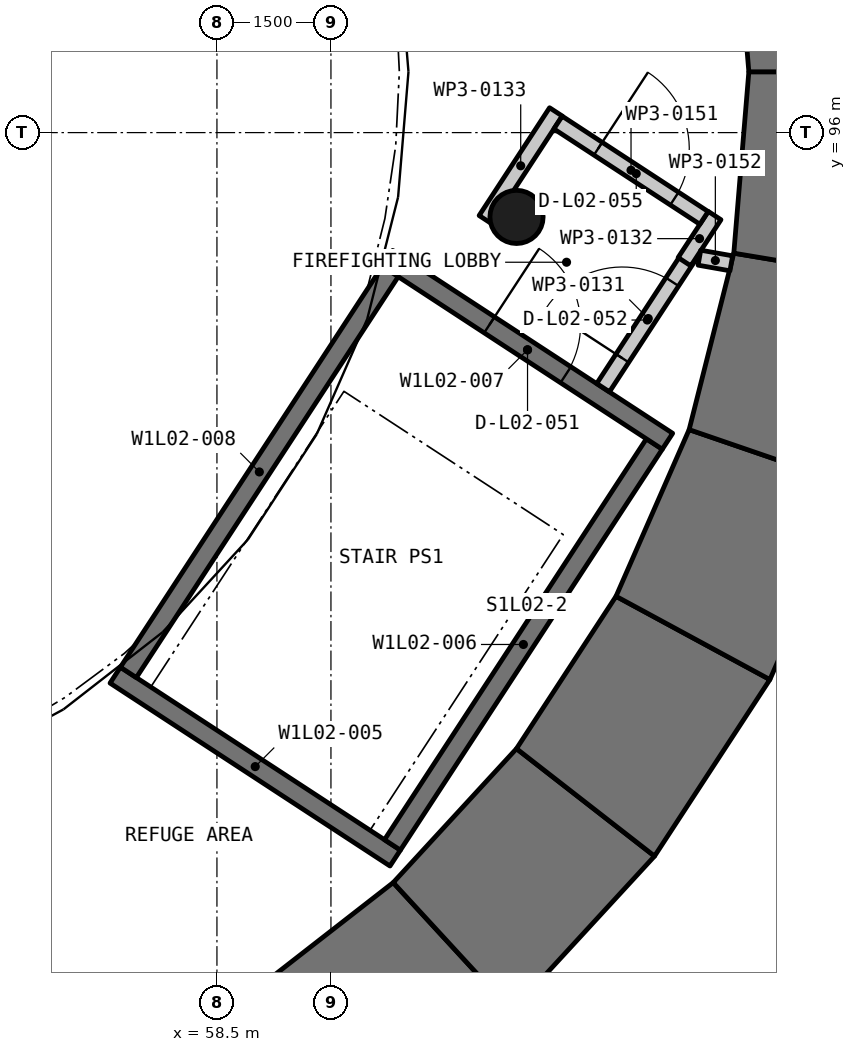
"""IFC4 building model, lengths in metres.
Left out: names, types, materials, properties, quantities, classifications, styles, units other than length and angle.
Written with IfcOpenShell. Run it as: python <this file> out.ifc"""

import sys

from ifc_helpers import new_model, si_unit, direction, frame, frame_2d, origin, origin_2d, place, context, subcontext, project, spatial, polyline, rectangle, circle, outline, extrude, element, fill, save


model = new_model("IFC4")
c1 = context("Model", 3, precision=1e-05, world=origin(), true_north=direction((0.0, 1.0)))
c2 = subcontext(c1, "Body", "Model", "MODEL_VIEW")
j1 = project(units=[si_unit("LENGTHUNIT", "METRE"), si_unit("PLANEANGLEUNIT", "RADIAN")], contexts=[c1])
p1 = place(None, origin())
s1 = spatial("IfcSite", under=j1, at=p1, CompositionType="ELEMENT")
p2 = place(p1, origin())
s2 = spatial("IfcBuilding", under=s1, at=p2, CompositionType="ELEMENT")
p3 = place(p2, frame((0.0, 0.0, 11.25)))
s3 = spatial("IfcBuildingStorey", under=s2, at=p3, CompositionType="ELEMENT", Elevation=11.25)
p4 = place(p3, frame((62.442, 94.891, -0.3), z_axis=(0.0, 0.0, 1.0), x_axis=(1.0, 0.0, 0.0)))
e1 = element("IfcColumn", 1, at=p4, inside=s3, PredefinedType="COLUMN", context=c2, shape_type="SweptSolid", body=[
    extrude(circle(Radius=0.35, at=origin_2d()), origin(), (0.0, 0.0, 1.0), 4.5),
])
p5 = place(p3, frame((59.484, 83.641, -0.3), z_axis=(0.0, 0.0, 1.0), x_axis=(0.789101039288, 0.614263420525, 0.0)))
e2 = element("IfcWall", 2, at=p5, inside=s3, PredefinedType="SHEAR", context=c2, shape_type="SweptSolid", body=[
    extrude(outline(polyline([(-0.0, -1.147), (2.774, -1.147), (2.584, 1.147), (0.19, 1.147), (-0.0, -1.147)])), origin(), (0.0, 0.0, 1.0), 2.25),
])
p6 = place(p3, frame((61.534, 85.217, -0.3), z_axis=(0.0, 0.0, 1.0), x_axis=(0.677292845284, 0.73571353238, 0.0)))
e3 = element("IfcWall", 3, at=p6, inside=s3, PredefinedType="SHEAR", context=c2, shape_type="SweptSolid", body=[
    extrude(outline(polyline([(0.0, -1.147), (2.775, -1.147), (2.585, 1.147), (0.19, 1.147), (0.0, -1.147)])), origin(), (0.0, 0.0, 1.0), 2.25),
])
p7 = place(p3, frame((63.297, 87.109, -0.3), z_axis=(0.0, 0.0, 1.0), x_axis=(0.546960095535, 0.83715867904, 0.0)))
e4 = element("IfcWall", 4, at=p7, inside=s3, PredefinedType="SHEAR", context=c2, shape_type="SweptSolid", body=[
    extrude(outline(polyline([(0.0, -1.147), (2.775, -1.147), (2.585, 1.147), (0.19, 1.147), (0.0, -1.147)])), origin(), (0.0, 0.0, 1.0), 2.25),
])
p8 = place(p3, frame((64.725, 89.265, -0.3), z_axis=(0.0, 0.0, 1.0), x_axis=(0.401700336395, 0.91577117215, 0.0)))
e5 = element("IfcWall", 5, at=p8, inside=s3, PredefinedType="SHEAR", context=c2, shape_type="SweptSolid", body=[
    extrude(outline(polyline([(0.0, -1.147), (2.774, -1.147), (2.584, 1.147), (0.19, 1.147), (0.0, -1.147)])), origin(), (0.0, 0.0, 1.0), 2.25),
])
p9 = place(p3, frame((65.778, 91.627, -0.3), z_axis=(0.0, 0.0, 1.0), x_axis=(0.24549513697, 0.96939782222, 0.0)))
e6 = element("IfcWall", 6, at=p9, inside=s3, PredefinedType="SHEAR", context=c2, shape_type="SweptSolid", body=[
    extrude(outline(polyline([(-0.0, -1.147), (2.775, -1.147), (2.585, 1.147), (0.19, 1.147), (-0.0, -1.147)])), origin(), (0.0, 0.0, 1.0), 2.25),
])
p10 = place(p3, frame((66.428, 94.13, -0.3), z_axis=(0.0, 0.0, 1.0), x_axis=(0.082535726981, 0.996588106377, 0.0)))
e7 = element("IfcWall", 7, at=p10, inside=s3, PredefinedType="SHEAR", context=c2, shape_type="SweptSolid", body=[
    extrude(outline(polyline([(0.0, -1.147), (2.775, -1.147), (2.584, 1.147), (0.19, 1.147), (0.0, -1.147)])), origin(), (0.0, 0.0, 1.0), 2.25),
])
p11 = place(p3, frame((66.657, 96.705, -0.3), z_axis=(0.0, 0.0, 1.0), x_axis=(-0.082535726981, 0.996588106377, 0.0)))
e8 = element("IfcWall", 8, at=p11, inside=s3, PredefinedType="SHEAR", context=c2, shape_type="SweptSolid", body=[
    extrude(outline(polyline([(0.0, -1.147), (2.775, -1.147), (2.584, 1.147), (0.19, 1.147), (0.0, -1.147)])), origin(), (0.0, 0.0, 1.0), 2.25),
])
p12 = place(p3, frame((59.34, 83.907, 1.95), z_axis=(0.0, 0.0, 1.0), x_axis=(0.789096659822, 0.614269046476, 0.0)))
e9 = element("IfcWall", 9, at=p12, inside=s3, PredefinedType="SHEAR", context=c2, shape_type="SweptSolid", body=[
    extrude(outline(polyline([(-0.0, -0.848), (2.676, -0.848), (2.535, 0.848), (0.14, 0.848), (-0.0, -0.848)])), origin(), (0.0, 0.0, 1.0), 2.25),
])
p13 = place(p3, frame((61.348, 85.456, 1.95), z_axis=(0.0, 0.0, 1.0), x_axis=(0.677256164306, 0.735747298949, 0.0)))
e10 = element("IfcWall", 10, at=p13, inside=s3, PredefinedType="SHEAR", context=c2, shape_type="SweptSolid", body=[
    extrude(outline(polyline([(0.0, -0.848), (2.676, -0.848), (2.535, 0.848), (0.14, 0.848), (0.0, -0.848)])), origin(), (0.0, 0.0, 1.0), 2.25),
])
p14 = place(p3, frame((63.074, 87.313, 1.95), z_axis=(0.0, 0.0, 1.0), x_axis=(0.546927267379, 0.837180126494, 0.0)))
e11 = element("IfcWall", 11, at=p14, inside=s3, PredefinedType="SHEAR", context=c2, shape_type="SweptSolid", body=[
    extrude(outline(polyline([(0.0, -0.848), (2.676, -0.848), (2.535, 0.848), (0.141, 0.848), (0.0, -0.848)])), origin(), (0.0, 0.0, 1.0), 2.25),
])
p15 = place(p3, frame((64.471, 89.43, 1.95), z_axis=(0.0, 0.0, 1.0), x_axis=(0.401680291361, 0.915779964583, 0.0)))
e12 = element("IfcWall", 12, at=p15, inside=s3, PredefinedType="SHEAR", context=c2, shape_type="SweptSolid", body=[
    extrude(outline(polyline([(0.0, -0.848), (2.676, -0.848), (2.535, 0.848), (0.141, 0.848), (0.0, -0.848)])), origin(), (0.0, 0.0, 1.0), 2.25),
])
p16 = place(p3, frame((65.5, 91.748, 1.95), z_axis=(0.0, 0.0, 1.0), x_axis=(0.245454430511, 0.969408130017, 0.0)))
e13 = element("IfcWall", 13, at=p16, inside=s3, PredefinedType="SHEAR", context=c2, shape_type="SweptSolid", body=[
    extrude(outline(polyline([(0.0, -0.848), (2.676, -0.848), (2.535, 0.848), (0.14, 0.848), (0.0, -0.848)])), origin(), (0.0, 0.0, 1.0), 2.25),
])
p17 = place(p3, frame((66.134, 94.204, 1.95), z_axis=(0.0, 0.0, 1.0), x_axis=(0.082577286265, 0.996584663635, 0.0)))
e14 = element("IfcWall", 14, at=p17, inside=s3, PredefinedType="SHEAR", context=c2, shape_type="SweptSolid", body=[
    extrude(outline(polyline([(0.0, -0.848), (2.676, -0.848), (2.535, 0.848), (0.141, 0.848), (0.0, -0.848)])), origin(), (0.0, 0.0, 1.0), 2.25),
])
p18 = place(p3, frame((66.355, 96.73, 1.95), z_axis=(0.0, 0.0, 1.0), x_axis=(-0.082577286265, 0.996584663635, 0.0)))
e15 = element("IfcWall", 15, at=p18, inside=s3, PredefinedType="SHEAR", context=c2, shape_type="SweptSolid", body=[
    extrude(outline(polyline([(0.0, -0.848), (2.676, -0.848), (2.535, 0.848), (0.141, 0.848), (0.0, -0.848)])), origin(), (0.0, 0.0, 1.0), 2.25),
])
p19 = place(p3, frame((57.162, 88.862, -0.3), z_axis=(0.0, 0.0, 1.0), x_axis=(0.837178733665, -0.546929399373, 0.0)))
e16 = element("IfcWall", 16, at=p19, inside=s3, PredefinedType="SHEAR", context=c2, shape_type="SweptSolid", body=[
    extrude(rectangle(XDim=4.4, YDim=0.25, at=frame_2d((2.2, 0.0))), origin(), (0.0, 0.0, 1.0), 4.5),
])
p20 = place(p3, frame((60.809, 86.629, -0.3), z_axis=(0.0, 0.0, 1.0), x_axis=(0.546949670387, 0.837165490249, 0.0)))
e17 = element("IfcWall", 17, at=p20, inside=s3, PredefinedType="SHEAR", context=c2, shape_type="SweptSolid", body=[
    extrude(rectangle(XDim=6.3, YDim=0.25, at=frame_2d((3.15, 0.0))), origin(), (0.0, 0.0, 1.0), 4.5),
])
p21 = place(p3, frame((60.744, 94.346, -0.3), z_axis=(0.0, 0.0, 1.0), x_axis=(0.837178733665, -0.546929399373, 0.0)))
e18 = element("IfcWall", 18, at=p21, inside=s3, PredefinedType="SHEAR", context=c2, shape_type="SweptSolid", body=[
    extrude(rectangle(XDim=4.4, YDim=0.25, at=frame_2d((2.2, 0.0))), origin(), (0.0, 0.0, 1.0), 4.5),
])
p22 = place(p21, frame((1.601, 0.0, 0.3)))
e19 = element("IfcOpeningElement", 19, at=p22, cuts=e18, PredefinedType="OPENING", context=c2, shape_type="SweptSolid", body=[
    extrude(rectangle(XDim=1.2, YDim=2.2, at=frame_2d((0.6, 1.1))), frame((0.0, 0.135, 0.0), z_axis=(0.0, -1.0, 0.0), x_axis=(1.0, 0.0, 0.0)), (0.0, 0.0, 1.0), 0.27),
])
p23 = place(p3, frame((57.335, 88.898, -0.3), z_axis=(0.0, 0.0, 1.0), x_axis=(0.546922510141, 0.837183234364, 0.0)))
e20 = element("IfcWall", 20, at=p23, inside=s3, PredefinedType="SHEAR", context=c2, shape_type="SweptSolid", body=[
    extrude(rectangle(XDim=6.3, YDim=0.25, at=frame_2d((3.15, 0.0))), origin(), (0.0, 0.0, 1.0), 4.5),
])
p24 = place(p3, frame((63.581, 92.644, 0.0), z_axis=(0.0, 0.0, 1.0), x_axis=(0.546949633936, 0.837165514063, 0.0)))
e21 = element("IfcWall", 21, at=p24, inside=s3, PredefinedType="PARTITIONING", context=c2, shape_type="SweptSolid", body=[
    extrude(rectangle(XDim=2.173, YDim=0.2, at=frame_2d((1.086, 0.0))), origin(), (0.0, 0.0, 1.0), 4.2),
])
p25 = place(p24, frame((0.463, 0.0, 0.0)))
e22 = element("IfcOpeningElement", 22, at=p25, cuts=e21, PredefinedType="OPENING", context=c2, shape_type="SweptSolid", body=[
    extrude(rectangle(XDim=1.2, YDim=2.1, at=frame_2d((0.6, 1.05))), frame((0.0, 0.11, 0.0), z_axis=(0.0, -1.0, 0.0), x_axis=(1.0, 0.0, 0.0)), (0.0, 0.0, 1.0), 0.22),
])
p26 = place(p3, frame((64.652, 94.302, 0.0), z_axis=(0.0, 0.0, 1.0), x_axis=(0.54690452618, 0.837194982811, 0.0)))
e23 = element("IfcWall", 23, at=p26, inside=s3, PredefinedType="PARTITIONING", context=c2, shape_type="SweptSolid", body=[
    extrude(rectangle(XDim=0.725, YDim=0.2, at=frame_2d((0.362, 0.0))), origin(), (0.0, 0.0, 1.0), 4.2),
])
p27 = place(p3, frame((62.033, 94.854, 0.0), z_axis=(0.0, 0.0, 1.0), x_axis=(0.546962048529, 0.837157403043, 0.0)))
e24 = element("IfcWall", 24, at=p27, inside=s3, PredefinedType="PARTITIONING", context=c2, shape_type="SweptSolid", body=[
    extrude(rectangle(XDim=1.694, YDim=0.2, at=frame_2d((0.847, 0.0))), origin(), (0.0, 0.0, 1.0), 3.4),
])
p28 = place(p3, frame((62.988, 96.133, 0.0), z_axis=(0.0, 0.0, 1.0), x_axis=(0.837155155432, -0.546965488613, 0.0)))
e25 = element("IfcWall", 25, at=p28, inside=s3, PredefinedType="PARTITIONING", context=c2, shape_type="SweptSolid", body=[
    extrude(rectangle(XDim=2.294, YDim=0.2, at=frame_2d((1.147, 0.0))), origin(), (0.0, 0.0, 1.0), 4.2),
])
p29 = place(p28, frame((0.629, 0.0, 0.0)))
e26 = element("IfcOpeningElement", 26, at=p29, cuts=e25, PredefinedType="OPENING", context=c2, shape_type="SweptSolid", body=[
    extrude(rectangle(XDim=1.2, YDim=2.1, at=frame_2d((0.6, 1.05))), frame((0.0, 0.11, 0.0), z_axis=(0.0, -1.0, 0.0), x_axis=(1.0, 0.0, 0.0)), (0.0, 0.0, 1.0), 0.22),
])
p30 = place(p3, frame((65.267, 94.281, 0.0), z_axis=(0.0, 0.0, 1.0), x_axis=(-0.984783558818, 0.173785333909, 0.0)))
e27 = element("IfcWall", 27, at=p30, inside=s3, PredefinedType="PARTITIONING", context=c2, shape_type="SweptSolid", body=[
    extrude(rectangle(XDim=0.426, YDim=0.2, at=frame_2d((0.213, 0.0))), origin(), (0.0, 0.0, 1.0), 4.2),
])
p31 = place(p22, origin())
e28 = element("IfcDoor", 28, at=p31, inside=s3, OperationType="SINGLE_SWING_RIGHT", PredefinedType="DOOR", context=c2, shape_type="SweptSolid", body=[
    extrude(rectangle(XDim=1.2, YDim=2.2, at=frame_2d((0.6, 1.1))), frame((0.0, 0.025, 0.0), z_axis=(0.0, -1.0, 0.0), x_axis=(1.0, 0.0, 0.0)), (0.0, 0.0, 1.0), 0.05),
])
fill(e19, e28)
p32 = place(p25, origin())
e29 = element("IfcDoor", 29, at=p32, inside=s3, OperationType="SINGLE_SWING_RIGHT", PredefinedType="DOOR", context=c2, shape_type="SweptSolid", body=[
    extrude(rectangle(XDim=1.2, YDim=2.1, at=frame_2d((0.6, 1.05))), frame((0.0, 0.025, 0.0), z_axis=(0.0, -1.0, 0.0), x_axis=(1.0, 0.0, 0.0)), (0.0, 0.0, 1.0), 0.05),
])
fill(e22, e29)
p33 = place(p29, origin())
e30 = element("IfcDoor", 30, at=p33, inside=s3, OperationType="SINGLE_SWING_LEFT", PredefinedType="DOOR", context=c2, shape_type="SweptSolid", body=[
    extrude(rectangle(XDim=1.2, YDim=2.1, at=frame_2d((0.6, 1.05))), frame((0.0, 0.025, 0.0), z_axis=(0.0, -1.0, 0.0), x_axis=(1.0, 0.0, 0.0)), (0.0, 0.0, 1.0), 0.05),
])
fill(e26, e30)
save(model, sys.argv[1])
